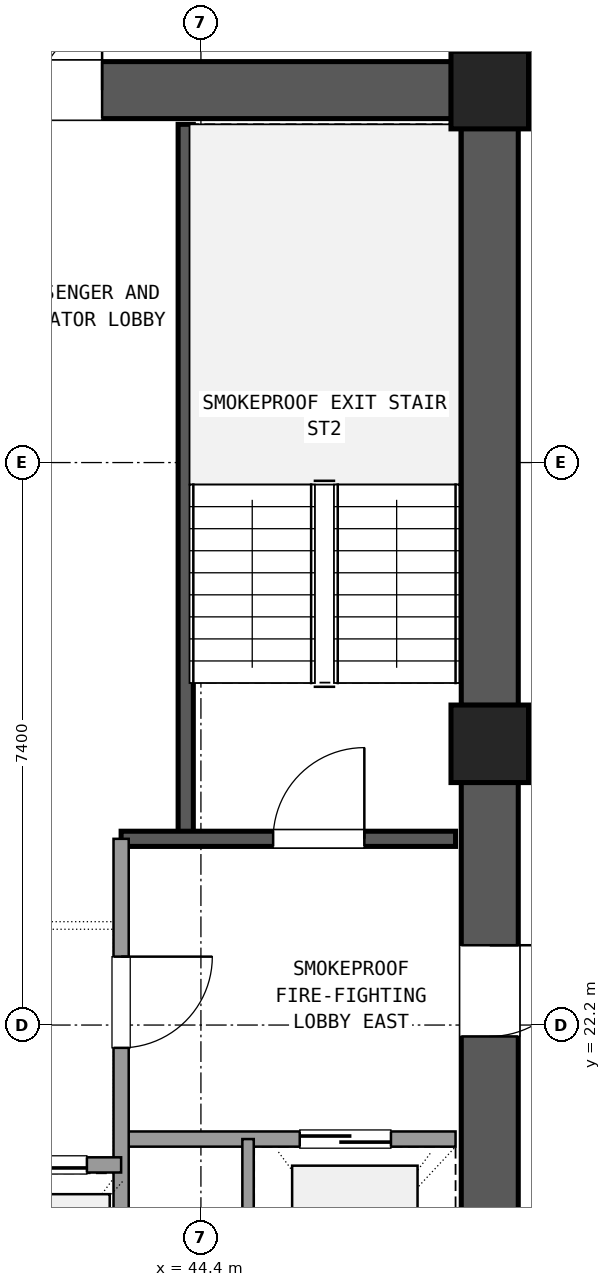
"""IFC4 building model, lengths in metres.
Left out: names, types, materials, properties, quantities, classifications, styles, units other than length and angle.
Written with IfcOpenShell. Run it as: python <this file> out.ifc"""

import sys

from ifc_helpers import new_model, si_unit, direction, frame, frame_2d, origin, origin_2d, place, context, subcontext, project, spatial, rectangle, extrude, element, fill, save


model = new_model("IFC4")
c1 = context("Model", 3, precision=1e-05, world=origin(), true_north=direction((0.0, 1.0)))
c2 = subcontext(c1, "Body", "Model", "MODEL_VIEW")
j1 = project(units=[si_unit("LENGTHUNIT", "METRE"), si_unit("PLANEANGLEUNIT", "RADIAN")], contexts=[c1])
p1 = place(None, origin())
s1 = spatial("IfcSite", under=j1, at=p1, CompositionType="ELEMENT")
p2 = place(p1, origin())
s2 = spatial("IfcBuilding", under=s1, at=p2, CompositionType="ELEMENT")
p3 = place(p2, frame((0.0, 0.0, 152.82)))
s3 = spatial("IfcBuildingStorey", under=s2, at=p3, CompositionType="ELEMENT", Elevation=152.82)
for number, where, z_axis, x_axis in (
    (1, (48.2, 25.9, 0.0), (0.0, 0.0, 1.0), (1.0, 0.0, 0.0)),
    (2, (48.2, 34.5, 0.0), (0.0, 0.0, 1.0), (1.0, 0.0, 0.0)),
):
    element("IfcColumn", number, at=place(p3, frame(where, z_axis=z_axis, x_axis=x_axis)), inside=s3, PredefinedType="COLUMN", context=c2, shape_type="SweptSolid", body=[
        extrude(rectangle(XDim=1.02, YDim=1.02, at=origin_2d()), origin(), (0.0, 0.0, 1.0), 3.6),
    ])
p4 = place(p3, frame((48.2, 17.805, 0.0), z_axis=(0.0, 0.0, 1.0), x_axis=(0.0, 1.0, 0.0)))
e3 = element("IfcWall", 3, at=p4, inside=s3, PredefinedType="SHEAR", context=c2, shape_type="SweptSolid", body=[
    extrude(rectangle(XDim=7.59, YDim=0.75, at=frame_2d((3.795, 0.0))), origin(), (0.0, 0.0, 1.0), 3.32),
])
p5 = place(p4, frame((4.245, 0.0, 0.0)))
e4 = element("IfcOpeningElement", 4, at=p5, cuts=e3, PredefinedType="OPENING", context=c2, shape_type="SweptSolid", body=[
    extrude(rectangle(XDim=1.2, YDim=2.15, at=frame_2d((0.6, 1.075))), frame((0.0, 0.385, 0.0), z_axis=(0.0, -1.0, 0.0), x_axis=(1.0, 0.0, 0.0)), (0.0, 0.0, 1.0), 0.77),
])
p6 = place(p3, frame((48.2, 26.405, 0.0), z_axis=(0.0, 0.0, 1.0), x_axis=(0.0, 1.0, 0.0)))
e5 = element("IfcWall", 5, at=p6, inside=s3, PredefinedType="SHEAR", context=c2, shape_type="SweptSolid", body=[
    extrude(rectangle(XDim=7.59, YDim=0.75, at=frame_2d((3.795, 0.0))), origin(), (0.0, 0.0, 1.0), 3.32),
])
p7 = place(p3, frame((47.695, 34.5, 0.0), z_axis=(0.0, 0.0, 1.0), x_axis=(-1.0, 0.0, 0.0)))
e6 = element("IfcWall", 6, at=p7, inside=s3, PredefinedType="SHEAR", context=c2, shape_type="SweptSolid", body=[
    extrude(rectangle(XDim=10.19, YDim=0.75, at=frame_2d((5.095, 0.0))), origin(), (0.0, 0.0, 1.0), 3.32),
])
p8 = place(p7, frame((4.595, 0.0, 0.0)))
e7 = element("IfcOpeningElement", 7, at=p8, cuts=e6, PredefinedType="OPENING", context=c2, shape_type="SweptSolid", body=[
    extrude(rectangle(XDim=1.6, YDim=2.2, at=frame_2d((0.8, 1.1))), frame((0.0, 0.385, 0.0), z_axis=(0.0, -1.0, 0.0), x_axis=(1.0, 0.0, 0.0)), (0.0, 0.0, 1.0), 0.77),
])
p9 = place(p3, frame((44.2, 24.65, 0.0), z_axis=(0.0, 0.0, 1.0), x_axis=(0.0, 1.0, 0.0)))
e8 = element("IfcWall", 8, at=p9, inside=s3, PredefinedType="SHEAR", context=c2, shape_type="SweptSolid", body=[
    extrude(rectangle(XDim=9.4, YDim=0.2, at=frame_2d((4.7, 0.0))), origin(), (0.0, 0.0, 1.0), 3.32),
])
p10 = place(p3, frame((43.35, 24.65, 0.0), z_axis=(0.0, 0.0, 1.0), x_axis=(1.0, 0.0, 0.0)))
e9 = element("IfcWall", 9, at=p10, inside=s3, PredefinedType="SHEAR", context=c2, shape_type="SweptSolid", body=[
    extrude(rectangle(XDim=4.4, YDim=0.2, at=frame_2d((2.2, 0.0))), origin(), (0.0, 0.0, 1.0), 3.32),
])
p11 = place(p10, frame((2.0, 0.0, 0.0)))
e10 = element("IfcOpeningElement", 10, at=p11, cuts=e9, PredefinedType="OPENING", context=c2, shape_type="SweptSolid", body=[
    extrude(rectangle(XDim=1.2, YDim=2.15, at=frame_2d((0.6, 1.075))), frame((0.0, 0.11, 0.0), z_axis=(0.0, -1.0, 0.0), x_axis=(1.0, 0.0, 0.0)), (0.0, 0.0, 1.0), 0.22),
])
p12 = place(p3, frame((43.35, 20.7, 0.0), z_axis=(0.0, 0.0, 1.0), x_axis=(1.0, 0.0, 0.0)))
e11 = element("IfcWall", 11, at=p12, inside=s3, PredefinedType="SOLIDWALL", context=c2, shape_type="SweptSolid", body=[
    extrude(rectangle(XDim=4.4, YDim=0.2, at=frame_2d((2.2, 0.0))), origin(), (0.0, 0.0, 1.0), 2.61),
])
p13 = place(p12, frame((2.35, 0.0, 0.0)))
e12 = element("IfcOpeningElement", 12, at=p13, cuts=e11, PredefinedType="OPENING", context=c2, shape_type="SweptSolid", body=[
    extrude(rectangle(XDim=1.2, YDim=2.15, at=frame_2d((0.6, 1.075))), frame((0.0, 0.11, 0.0), z_axis=(0.0, -1.0, 0.0), x_axis=(1.0, 0.0, 0.0)), (0.0, 0.0, 1.0), 0.22),
])
p14 = place(p3, frame((43.35, 17.75, 0.0), z_axis=(0.0, 0.0, 1.0), x_axis=(0.0, 1.0, 0.0)))
e13 = element("IfcWall", 13, at=p14, inside=s3, PredefinedType="SOLIDWALL", context=c2, shape_type="SweptSolid", body=[
    extrude(rectangle(XDim=6.9, YDim=0.2, at=frame_2d((3.45, 0.0))), origin(), (0.0, 0.0, 1.0), 2.61),
])
p15 = place(p14, frame((4.15, 0.0, 0.0)))
e14 = element("IfcOpeningElement", 14, at=p15, cuts=e13, PredefinedType="OPENING", context=c2, shape_type="SweptSolid", body=[
    extrude(rectangle(XDim=1.2, YDim=2.15, at=frame_2d((0.6, 1.075))), frame((0.0, 0.11, 0.0), z_axis=(0.0, -1.0, 0.0), x_axis=(1.0, 0.0, 0.0)), (0.0, 0.0, 1.0), 0.22),
])
p16 = place(p3, frame((45.02, 17.75, 0.0), z_axis=(0.0, 0.0, 1.0), x_axis=(0.0, 1.0, 0.0)))
e15 = element("IfcWall", 15, at=p16, inside=s3, PredefinedType="PARTITIONING", context=c2, shape_type="SweptSolid", body=[
    extrude(rectangle(XDim=2.95, YDim=0.15, at=frame_2d((1.475, 0.0))), origin(), (0.0, 0.0, 1.0), 2.61),
])
p17 = place(p3, frame((37.25, 20.36, 0.0), z_axis=(0.0, 0.0, 1.0), x_axis=(1.0, 0.0, 0.0)))
e16 = element("IfcWall", 16, at=p17, inside=s3, PredefinedType="SOLIDWALL", context=c2, shape_type="SweptSolid", body=[
    extrude(rectangle(XDim=6.1, YDim=0.2, at=frame_2d((3.05, 0.0))), origin(), (0.0, 0.0, 1.0), 2.61),
])
p18 = place(p17, frame((0.45, 0.0, 0.0)))
e17 = element("IfcOpeningElement", 17, at=p18, cuts=e16, PredefinedType="OPENING", context=c2, shape_type="SweptSolid", body=[
    extrude(rectangle(XDim=1.1, YDim=2.15, at=frame_2d((0.55, 1.075))), frame((0.0, 0.11, 0.0), z_axis=(0.0, -1.0, 0.0), x_axis=(1.0, 0.0, 0.0)), (0.0, 0.0, 1.0), 0.22),
])
p19 = place(p17, frame((2.5, 0.0, 0.0)))
e18 = element("IfcOpeningElement", 18, at=p19, cuts=e16, PredefinedType="OPENING", context=c2, shape_type="SweptSolid", body=[
    extrude(rectangle(XDim=1.1, YDim=2.15, at=frame_2d((0.55, 1.075))), frame((0.0, 0.11, 0.0), z_axis=(0.0, -1.0, 0.0), x_axis=(1.0, 0.0, 0.0)), (0.0, 0.0, 1.0), 0.22),
])
p20 = place(p17, frame((4.55, 0.0, 0.0)))
e19 = element("IfcOpeningElement", 19, at=p20, cuts=e16, PredefinedType="OPENING", context=c2, shape_type="SweptSolid", body=[
    extrude(rectangle(XDim=1.1, YDim=2.15, at=frame_2d((0.55, 1.075))), frame((0.0, 0.11, 0.0), z_axis=(0.0, -1.0, 0.0), x_axis=(1.0, 0.0, 0.0)), (0.0, 0.0, 1.0), 0.22),
])
p21 = place(p11, origin())
e20 = element("IfcDoor", 20, at=p21, inside=s3, OperationType="SINGLE_SWING_RIGHT", PredefinedType="DOOR", context=c2, shape_type="SweptSolid", body=[
    extrude(rectangle(XDim=1.2, YDim=2.15, at=frame_2d((0.6, 1.075))), frame((0.0, 0.025, 0.0), z_axis=(0.0, -1.0, 0.0), x_axis=(1.0, 0.0, 0.0)), (0.0, 0.0, 1.0), 0.05),
])
fill(e10, e20)
p22 = place(p13, origin())
e21 = element("IfcDoor", 21, at=p22, inside=s3, OperationType="SLIDING_TO_RIGHT", PredefinedType="DOOR", context=c2, shape_type="SweptSolid", body=[
    extrude(rectangle(XDim=1.2, YDim=2.15, at=frame_2d((0.6, 1.075))), frame((0.0, 0.025, 0.0), z_axis=(0.0, -1.0, 0.0), x_axis=(1.0, 0.0, 0.0)), (0.0, 0.0, 1.0), 0.05),
])
fill(e12, e21)
p23 = place(p15, frame((1.2, 0.0, 0.0), z_axis=(0.0, 0.0, 1.0), x_axis=(-1.0, 0.0, 0.0)))
e22 = element("IfcDoor", 22, at=p23, inside=s3, OperationType="SINGLE_SWING_RIGHT", PredefinedType="DOOR", context=c2, shape_type="SweptSolid", body=[
    extrude(rectangle(XDim=1.2, YDim=2.15, at=frame_2d((0.6, 1.075))), frame((0.0, 0.025, 0.0), z_axis=(0.0, -1.0, 0.0), x_axis=(1.0, 0.0, 0.0)), (0.0, 0.0, 1.0), 0.05),
])
fill(e14, e22)
p24 = place(p5, frame((1.2, 0.0, 0.0), z_axis=(0.0, 0.0, 1.0), x_axis=(-1.0, 0.0, 0.0)))
e23 = element("IfcDoor", 23, at=p24, inside=s3, OperationType="SINGLE_SWING_RIGHT", PredefinedType="DOOR", context=c2, shape_type="SweptSolid", body=[
    extrude(rectangle(XDim=1.2, YDim=2.15, at=frame_2d((0.6, 1.075))), frame((0.0, 0.025, 0.0), z_axis=(0.0, -1.0, 0.0), x_axis=(1.0, 0.0, 0.0)), (0.0, 0.0, 1.0), 0.05),
])
fill(e4, e23)
p25 = place(p8, frame((1.6, 0.0, 0.0), z_axis=(0.0, 0.0, 1.0), x_axis=(-1.0, 0.0, 0.0)))
e24 = element("IfcDoor", 24, at=p25, inside=s3, OperationType="DOUBLE_DOOR_SINGLE_SWING", PredefinedType="DOOR", context=c2, shape_type="SweptSolid", body=[
    extrude(rectangle(XDim=1.6, YDim=2.2, at=frame_2d((0.8, 1.1))), frame((0.0, 0.025, 0.0), z_axis=(0.0, -1.0, 0.0), x_axis=(1.0, 0.0, 0.0)), (0.0, 0.0, 1.0), 0.05),
])
fill(e7, e24)
p26 = place(p20, origin())
e25 = element("IfcDoor", 25, at=p26, inside=s3, OperationType="SLIDING_TO_LEFT", PredefinedType="DOOR", context=c2, shape_type="SweptSolid", body=[
    extrude(rectangle(XDim=1.1, YDim=2.15, at=frame_2d((0.55, 1.075))), frame((0.0, 0.025, 0.0), z_axis=(0.0, -1.0, 0.0), x_axis=(1.0, 0.0, 0.0)), (0.0, 0.0, 1.0), 0.05),
])
fill(e19, e25)
save(model, sys.argv[1])
